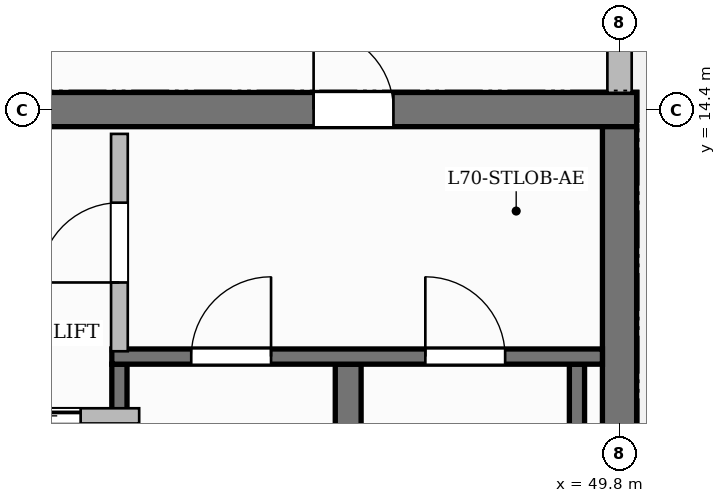
"""IFC4 building model, lengths in metres.
Left out: names, types, materials, properties, quantities, classifications, styles, units other than length and angle.
Written with IfcOpenShell. Run it as: python <this file> out.ifc"""

import sys

from ifc_helpers import new_model, si_unit, direction, frame, frame_2d, origin, place, context, subcontext, project, spatial, rectangle, extrude, source, transform, mapped, element, fill, save


model = new_model("IFC4")
c1 = context("Model", 3, precision=1e-05, world=origin(), true_north=direction((0.0, 1.0)))
c2 = subcontext(c1, "Body", "Model", "MODEL_VIEW")
j1 = project(units=[si_unit("LENGTHUNIT", "METRE"), si_unit("PLANEANGLEUNIT", "RADIAN")], contexts=[c1])
p1 = place(None, origin())
s1 = spatial("IfcSite", under=j1, at=p1, CompositionType="ELEMENT")
p2 = place(p1, origin())
s2 = spatial("IfcBuilding", under=s1, at=p2, CompositionType="ELEMENT")
p3 = place(p2, frame((0.0, 0.0, 278.9)))
s3 = spatial("IfcBuildingStorey", under=s2, at=p3, CompositionType="ELEMENT", Elevation=278.9)
p4 = place(p3, frame((34.575, 14.4, 0.0), z_axis=(0.0, 0.0, 1.0), x_axis=(1.0, 0.0, 0.0)))
e1 = element("IfcWall", 1, at=p4, inside=s3, PredefinedType="SHEAR", context=c2, shape_type="SweptSolid", body=[
    extrude(rectangle(XDim=15.45, YDim=0.45, at=frame_2d((7.725, 0.0))), origin(), (0.0, 0.0, 1.0), 3.85),
])
p5 = place(p4, frame((5.355, 0.0, 0.0)))
e2 = element("IfcOpeningElement", 2, at=p5, cuts=e1, PredefinedType="OPENING", context=c2, shape_type="SweptSolid", body=[
    extrude(rectangle(XDim=1.5, YDim=2.2, at=frame_2d((0.75, 1.1))), frame((0.0, 0.235, 0.0), z_axis=(0.0, -1.0, 0.0), x_axis=(1.0, 0.0, 0.0)), (0.0, 0.0, 1.0), 0.47),
])
p6 = place(p4, frame((1.57, 0.0, 0.0)))
e3 = element("IfcOpeningElement", 3, at=p6, cuts=e1, PredefinedType="OPENING", context=c2, shape_type="SweptSolid", body=[
    extrude(rectangle(XDim=1.05, YDim=2.15, at=frame_2d((0.525, 1.075))), frame((0.0, 0.235, 0.0), z_axis=(0.0, -1.0, 0.0), x_axis=(1.0, 0.0, 0.0)), (0.0, 0.0, 1.0), 0.47),
])
p7 = place(p4, frame((11.2, 0.0, 0.0)))
e4 = element("IfcOpeningElement", 4, at=p7, cuts=e1, PredefinedType="OPENING", context=c2, shape_type="SweptSolid", body=[
    extrude(rectangle(XDim=1.05, YDim=2.15, at=frame_2d((0.525, 1.075))), frame((0.0, 0.235, 0.0), z_axis=(0.0, -1.0, 0.0), x_axis=(1.0, 0.0, 0.0)), (0.0, 0.0, 1.0), 0.47),
])
p8 = place(p3, frame((49.8, 3.825, 0.0), z_axis=(0.0, 0.0, 1.0), x_axis=(0.0, 1.0, 0.0)))
e5 = element("IfcWall", 5, at=p8, inside=s3, PredefinedType="SHEAR", context=c2, shape_type="SweptSolid", body=[
    extrude(rectangle(XDim=10.35, YDim=0.45, at=frame_2d((5.175, 0.0))), origin(), (0.0, 0.0, 1.0), 3.85),
])
p9 = place(p3, frame((43.22, 4.1, 0.0), z_axis=(0.0, 0.0, 1.0), x_axis=(0.0, 1.0, 0.0)))
e6 = element("IfcWall", 6, at=p9, inside=s3, PredefinedType="SHEAR", context=c2, shape_type="SweptSolid", body=[
    extrude(rectangle(XDim=6.95, YDim=0.2, at=frame_2d((3.475, 0.0))), origin(), (0.0, 0.0, 1.0), 3.85),
])
p10 = place(p3, frame((46.23, 4.1, 0.0), z_axis=(0.0, 0.0, 1.0), x_axis=(0.0, 1.0, 0.0)))
e7 = element("IfcWall", 7, at=p10, inside=s3, PredefinedType="SHEAR", context=c2, shape_type="SweptSolid", body=[
    extrude(rectangle(XDim=6.95, YDim=0.34, at=frame_2d((3.475, 0.0))), origin(), (0.0, 0.0, 1.0), 3.85),
])
p11 = place(p3, frame((49.24, 4.1, 0.0), z_axis=(0.0, 0.0, 1.0), x_axis=(0.0, 1.0, 0.0)))
e8 = element("IfcWall", 8, at=p11, inside=s3, PredefinedType="SHEAR", context=c2, shape_type="SweptSolid", body=[
    extrude(rectangle(XDim=6.95, YDim=0.2, at=frame_2d((3.475, 0.0))), origin(), (0.0, 0.0, 1.0), 3.85),
])
p12 = place(p3, frame((43.12, 11.15, 0.0), z_axis=(0.0, 0.0, 1.0), x_axis=(1.0, 0.0, 0.0)))
e9 = element("IfcWall", 9, at=p12, inside=s3, PredefinedType="SHEAR", context=c2, shape_type="SweptSolid", body=[
    extrude(rectangle(XDim=6.455, YDim=0.2, at=frame_2d((3.228, 0.0))), origin(), (0.0, 0.0, 1.0), 3.85),
])
p13 = place(p12, frame((1.045, 0.0, 0.0)))
e10 = element("IfcOpeningElement", 10, at=p13, cuts=e9, PredefinedType="OPENING", context=c2, shape_type="SweptSolid", body=[
    extrude(rectangle(XDim=1.05, YDim=2.2, at=frame_2d((0.525, 1.1))), frame((0.0, 0.11, 0.0), z_axis=(0.0, -1.0, 0.0), x_axis=(1.0, 0.0, 0.0)), (0.0, 0.0, 1.0), 0.22),
])
p14 = place(p12, frame((4.125, 0.0, 0.0)))
e11 = element("IfcOpeningElement", 11, at=p14, cuts=e9, PredefinedType="OPENING", context=c2, shape_type="SweptSolid", body=[
    extrude(rectangle(XDim=1.05, YDim=2.2, at=frame_2d((0.525, 1.1))), frame((0.0, 0.11, 0.0), z_axis=(0.0, -1.0, 0.0), x_axis=(1.0, 0.0, 0.0)), (0.0, 0.0, 1.0), 0.22),
])
p15 = place(p3, frame((43.22, 11.22, 0.0), z_axis=(0.0, 0.0, 1.0), x_axis=(0.0, 1.0, 0.0)))
e12 = element("IfcWall", 12, at=p15, inside=s3, PredefinedType="PARTITIONING", context=c2, shape_type="SweptSolid", body=[
    extrude(rectangle(XDim=2.86, YDim=0.22, at=frame_2d((1.43, 0.0))), origin(), (0.0, 0.0, 1.0), 3.6),
])
p16 = place(p15, frame((0.905, 0.0, 0.0)))
e13 = element("IfcOpeningElement", 13, at=p16, cuts=e12, PredefinedType="OPENING", context=c2, shape_type="SweptSolid", body=[
    extrude(rectangle(XDim=1.05, YDim=2.15, at=frame_2d((0.525, 1.075))), frame((0.0, 0.12, 0.0), z_axis=(0.0, -1.0, 0.0), x_axis=(1.0, 0.0, 0.0)), (0.0, 0.0, 1.0), 0.24),
])
p17 = place(p3, frame((40.84, 10.37, 0.0), z_axis=(0.0, 0.0, 1.0), x_axis=(1.0, 0.0, 0.0)))
e14 = element("IfcWall", 14, at=p17, inside=s3, PredefinedType="PARTITIONING", context=c2, shape_type="SweptSolid", body=[
    extrude(rectangle(XDim=2.64, YDim=0.2, at=frame_2d((1.32, 0.0))), origin(), (0.0, 0.0, 1.0), 3.6),
])
p18 = place(p17, frame((0.77, 0.0, 0.0)))
e15 = element("IfcOpeningElement", 15, at=p18, cuts=e14, PredefinedType="OPENING", context=c2, shape_type="SweptSolid", body=[
    extrude(rectangle(XDim=1.1, YDim=2.2, at=frame_2d((0.55, 1.1))), frame((0.0, 0.11, 0.0), z_axis=(0.0, -1.0, 0.0), x_axis=(1.0, 0.0, 0.0)), (0.0, 0.0, 1.0), 0.22),
])
p19 = place(p3, frame((49.8, 14.62, 0.0), z_axis=(0.0, 0.0, 1.0), x_axis=(0.0, 1.0, 0.0)))
e16 = element("IfcWall", 16, at=p19, inside=s3, PredefinedType="SOLIDWALL", context=c2, shape_type="SweptSolid", body=[
    extrude(rectangle(XDim=6.93, YDim=0.32, at=frame_2d((3.465, 0.0))), origin(), (0.0, 0.0, 1.0), 3.185),
])
p20 = place(p19, frame((1.889, 0.0, 0.0)))
e17 = element("IfcOpeningElement", 17, at=p20, cuts=e16, PredefinedType="OPENING", context=c2, shape_type="SweptSolid", body=[
    extrude(rectangle(XDim=1.2, YDim=2.2, at=frame_2d((0.6, 1.1))), frame((0.0, 0.17, 0.0), z_axis=(0.0, -1.0, 0.0), x_axis=(1.0, 0.0, 0.0)), (0.0, 0.0, 1.0), 0.34),
])
p21 = place(p19, frame((3.884, 0.0, 0.8)))
e18 = element("IfcOpeningElement", 18, at=p21, cuts=e16, PredefinedType="OPENING", context=c2, shape_type="SweptSolid", body=[
    extrude(rectangle(XDim=1.8, YDim=1.85, at=frame_2d((0.9, 0.925))), frame((0.0, 0.17, 0.0), z_axis=(0.0, -1.0, 0.0), x_axis=(1.0, 0.0, 0.0)), (0.0, 0.0, 1.0), 0.34),
])
m1 = source(origin(), c2, "Body", "SweptSolid", [
    extrude(rectangle(XDim=1.05, YDim=2.2, at=frame_2d((0.525, 1.1))), frame((0.0, 0.025, 0.0), z_axis=(0.0, -1.0, 0.0), x_axis=(1.0, 0.0, 0.0)), (0.0, 0.0, 1.0), 0.05),
])
p22 = place(p13, origin())
e19 = element("IfcDoor", 19, at=p22, inside=s3, OperationType="SINGLE_SWING_RIGHT", PredefinedType="DOOR", context=c2, shape_type="MappedRepresentation", body=[
    mapped(m1, transform((0.0, 0.0, 0.0), scale=1.0)),
])
fill(e10, e19)
p23 = place(p14, origin())
e20 = element("IfcDoor", 20, at=p23, inside=s3, OperationType="SINGLE_SWING_LEFT", PredefinedType="DOOR", context=c2, shape_type="MappedRepresentation", body=[
    mapped(m1, transform((0.0, 0.0, 0.0), scale=1.0)),
])
fill(e11, e20)
m2 = source(origin(), c2, "Body", "SweptSolid", [
    extrude(rectangle(XDim=1.05, YDim=2.15, at=frame_2d((0.525, 1.075))), frame((0.0, 0.025, 0.0), z_axis=(0.0, -1.0, 0.0), x_axis=(1.0, 0.0, 0.0)), (0.0, 0.0, 1.0), 0.05),
])
p24 = place(p16, origin())
e21 = element("IfcDoor", 21, at=p24, inside=s3, OperationType="SINGLE_SWING_LEFT", PredefinedType="DOOR", context=c2, shape_type="MappedRepresentation", body=[
    mapped(m2, transform((0.0, 0.0, 0.0), scale=1.0)),
])
fill(e13, e21)
p25 = place(p7, origin())
e22 = element("IfcDoor", 22, at=p25, inside=s3, OperationType="SINGLE_SWING_LEFT", PredefinedType="DOOR", context=c2, shape_type="MappedRepresentation", body=[
    mapped(m2, transform((0.0, 0.0, 0.0), scale=1.0)),
])
fill(e4, e22)
m3 = source(origin(), c2, "Body", "SweptSolid", [
    extrude(rectangle(XDim=1.1, YDim=2.2, at=frame_2d((0.55, 1.1))), frame((0.0, 0.025, 0.0), z_axis=(0.0, -1.0, 0.0), x_axis=(1.0, 0.0, 0.0)), (0.0, 0.0, 1.0), 0.05),
])
p26 = place(p18, origin())
e23 = element("IfcDoor", 23, at=p26, inside=s3, OperationType="SLIDING_TO_LEFT", PredefinedType="DOOR", context=c2, shape_type="MappedRepresentation", body=[
    mapped(m3, transform((0.0, 0.0, 0.0), scale=1.0)),
])
fill(e15, e23)
save(model, sys.argv[1])
